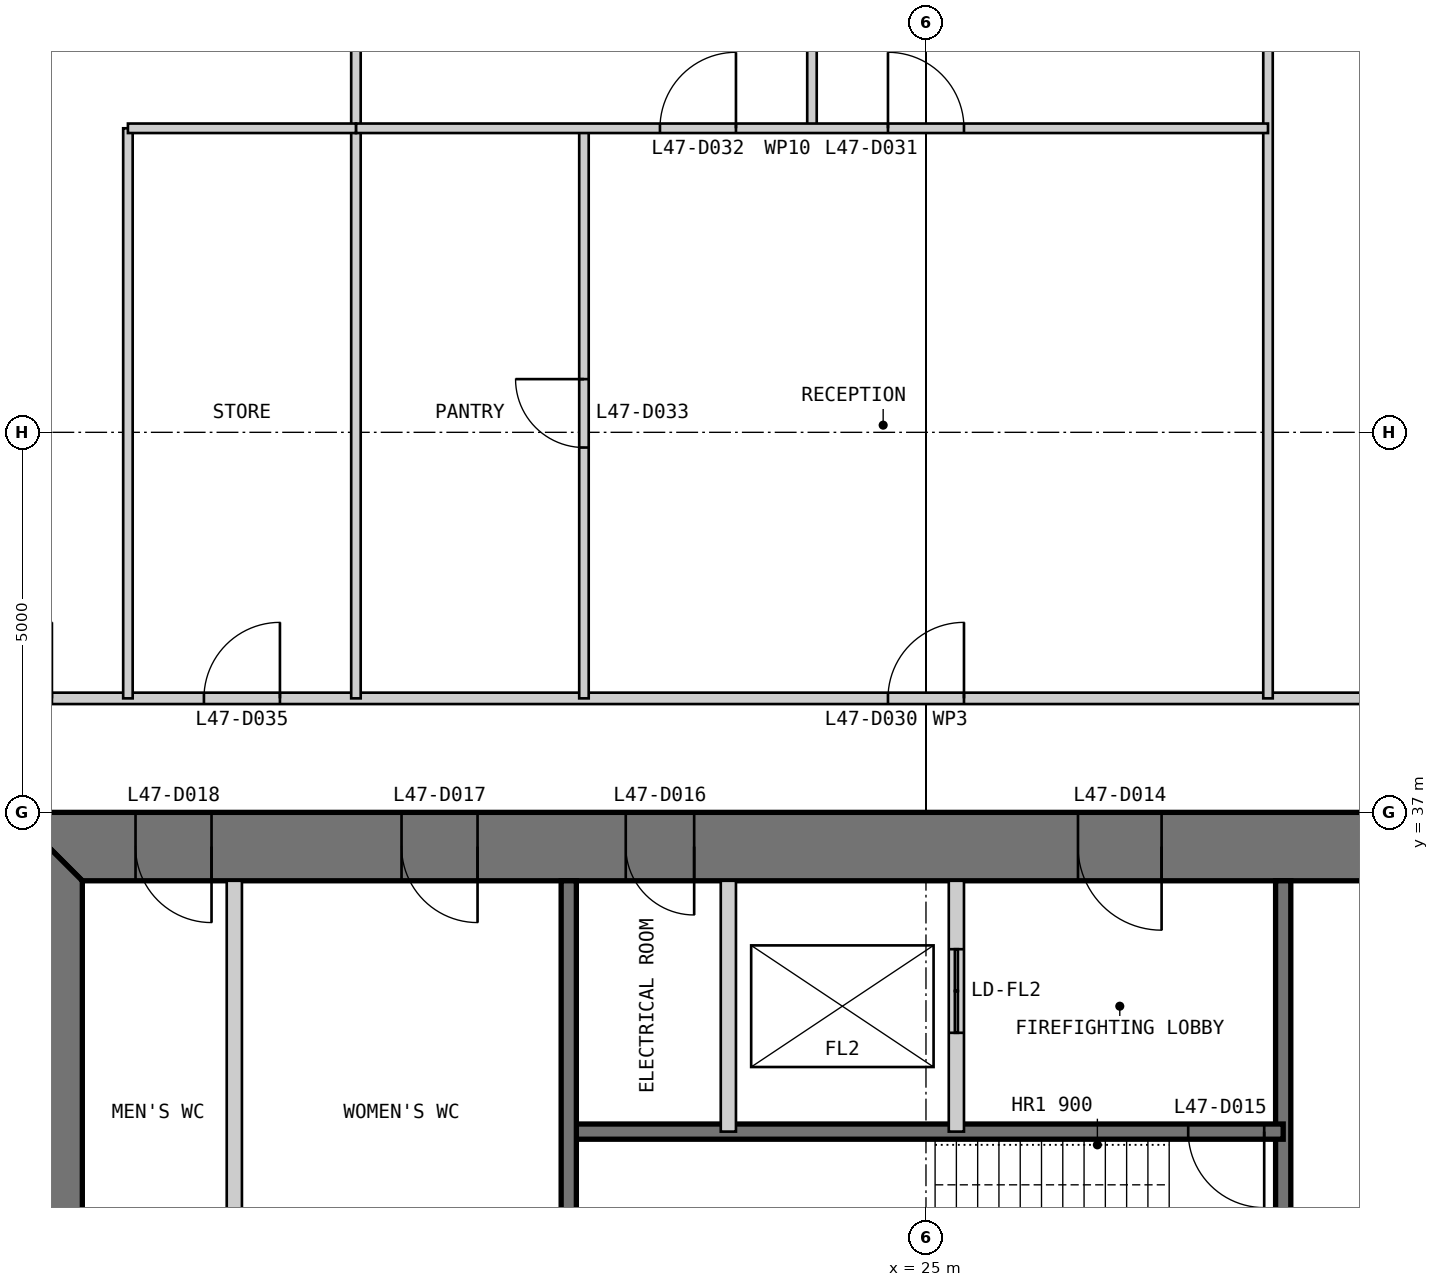
"""IFC4 building model, lengths in metres.
Left out: names, types, materials, properties, quantities, classifications, styles, units other than length and angle.
Written with IfcOpenShell. Run it as: python <this file> out.ifc"""

import sys

from ifc_helpers import new_model, si_unit, direction, frame, frame_2d, origin, place, context, subcontext, project, spatial, polyline, rectangle, outline, extrude, element, fill, save


model = new_model("IFC4")
c1 = context("Model", 3, precision=1e-05, world=origin(), true_north=direction((0.0, 1.0)))
c2 = subcontext(c1, "Body", "Model", "MODEL_VIEW")
j1 = project(units=[si_unit("LENGTHUNIT", "METRE"), si_unit("PLANEANGLEUNIT", "RADIAN")], contexts=[c1])
p1 = place(None, origin())
s1 = spatial("IfcSite", under=j1, at=p1, CompositionType="ELEMENT")
p2 = place(p1, origin())
s2 = spatial("IfcBuilding", under=s1, at=p2, CompositionType="ELEMENT")
p3 = place(p2, frame((0.0, 0.0, 201.8)))
s3 = spatial("IfcBuildingStorey", under=s2, at=p3, CompositionType="ELEMENT", Elevation=201.8)
p4 = place(p3, frame((37.0, 36.55, 0.0), z_axis=(0.0, 0.0, 1.0), x_axis=(-1.0, 0.0, 0.0)))
e1 = element("IfcWall", 1, at=p4, inside=s3, PredefinedType="SHEAR", context=c2, shape_type="SweptSolid", body=[
    extrude(outline(polyline([(0.0, -0.45), (24.0, -0.45), (23.1, 0.45), (0.9, 0.45), (0.0, -0.45)])), origin(), (0.0, 0.0, 1.0), 4.0),
])
p5 = place(p4, frame((4.9, 0.0, 0.0)))
e2 = element("IfcOpeningElement", 2, at=p5, cuts=e1, PredefinedType="OPENING", context=c2, shape_type="SweptSolid", body=[
    extrude(rectangle(XDim=1.0, YDim=2.2, at=frame_2d((0.5, 1.1))), frame((0.0, 0.46, 0.0), z_axis=(0.0, -1.0, 0.0), x_axis=(1.0, 0.0, 0.0)), (0.0, 0.0, 1.0), 0.92),
])
p6 = place(p4, frame((8.9, 0.0, 0.0)))
e3 = element("IfcOpeningElement", 3, at=p6, cuts=e1, PredefinedType="OPENING", context=c2, shape_type="SweptSolid", body=[
    extrude(rectangle(XDim=1.1, YDim=2.2, at=frame_2d((0.55, 1.1))), frame((0.0, 0.46, 0.0), z_axis=(0.0, -1.0, 0.0), x_axis=(1.0, 0.0, 0.0)), (0.0, 0.0, 1.0), 0.92),
])
p7 = place(p4, frame((15.05, 0.0, 0.0)))
e4 = element("IfcOpeningElement", 4, at=p7, cuts=e1, PredefinedType="OPENING", context=c2, shape_type="SweptSolid", body=[
    extrude(rectangle(XDim=0.9, YDim=2.2, at=frame_2d((0.45, 1.1))), frame((0.0, 0.46, 0.0), z_axis=(0.0, -1.0, 0.0), x_axis=(1.0, 0.0, 0.0)), (0.0, 0.0, 1.0), 0.92),
])
p8 = place(p4, frame((17.9, 0.0, 0.0)))
e5 = element("IfcOpeningElement", 5, at=p8, cuts=e1, PredefinedType="OPENING", context=c2, shape_type="SweptSolid", body=[
    extrude(rectangle(XDim=1.0, YDim=2.2, at=frame_2d((0.5, 1.1))), frame((0.0, 0.46, 0.0), z_axis=(0.0, -1.0, 0.0), x_axis=(1.0, 0.0, 0.0)), (0.0, 0.0, 1.0), 0.92),
])
p9 = place(p4, frame((21.4, 0.0, 0.0)))
e6 = element("IfcOpeningElement", 6, at=p9, cuts=e1, PredefinedType="OPENING", context=c2, shape_type="SweptSolid", body=[
    extrude(rectangle(XDim=1.0, YDim=2.2, at=frame_2d((0.5, 1.1))), frame((0.0, 0.46, 0.0), z_axis=(0.0, -1.0, 0.0), x_axis=(1.0, 0.0, 0.0)), (0.0, 0.0, 1.0), 0.92),
])
p10 = place(p3, frame((13.45, 36.1, 0.0), z_axis=(0.0, 0.0, 1.0), x_axis=(0.0, -1.0, 0.0)))
e7 = element("IfcWall", 7, at=p10, inside=s3, PredefinedType="SHEAR", context=c2, shape_type="SweptSolid", body=[
    extrude(outline(polyline([(-0.9, -0.45), (23.1, -0.45), (22.2, 0.45), (0.0, 0.45), (-0.9, -0.45)])), origin(), (0.0, 0.0, 1.0), 4.0),
])
p11 = place(p10, frame((20.2, 0.0, 0.0)))
e8 = element("IfcOpeningElement", 8, at=p11, cuts=e7, PredefinedType="OPENING", context=c2, shape_type="SweptSolid", body=[
    extrude(rectangle(XDim=1.0, YDim=2.2, at=frame_2d((0.5, 1.1))), frame((0.0, 0.46, 0.0), z_axis=(0.0, -1.0, 0.0), x_axis=(1.0, 0.0, 0.0)), (0.0, 0.0, 1.0), 0.92),
])
p12 = place(p10, frame((17.25, 0.0, 0.0)))
e9 = element("IfcOpeningElement", 9, at=p12, cuts=e7, PredefinedType="OPENING", context=c2, shape_type="SweptSolid", body=[
    extrude(rectangle(XDim=0.9, YDim=2.2, at=frame_2d((0.45, 1.1))), frame((0.0, 0.46, 0.0), z_axis=(0.0, -1.0, 0.0), x_axis=(1.0, 0.0, 0.0)), (0.0, 0.0, 1.0), 0.92),
])
p13 = place(p3, frame((29.7, 36.1, 0.0), z_axis=(0.0, 0.0, 1.0), x_axis=(0.0, -1.0, 0.0)))
e10 = element("IfcWall", 10, at=p13, inside=s3, PredefinedType="SOLIDWALL", context=c2, shape_type="SweptSolid", body=[
    extrude(rectangle(XDim=16.1, YDim=0.2, at=frame_2d((8.05, 0.0))), origin(), (0.0, 0.0, 1.0), 3.8),
])
p14 = place(p13, frame((7.217, 0.0, 0.0)))
e11 = element("IfcOpeningElement", 11, at=p14, cuts=e10, PredefinedType="OPENING", context=c2, shape_type="SweptSolid", body=[
    extrude(rectangle(XDim=1.1, YDim=2.2, at=frame_2d((0.55, 1.1))), frame((0.0, 0.11, 0.0), z_axis=(0.0, -1.0, 0.0), x_axis=(1.0, 0.0, 0.0)), (0.0, 0.0, 1.0), 0.22),
])
p15 = place(p13, frame((10.55, 0.0, 0.0)))
e12 = element("IfcOpeningElement", 12, at=p15, cuts=e10, PredefinedType="OPENING", context=c2, shape_type="SweptSolid", body=[
    extrude(rectangle(XDim=1.1, YDim=2.2, at=frame_2d((0.55, 1.1))), frame((0.0, 0.11, 0.0), z_axis=(0.0, -1.0, 0.0), x_axis=(1.0, 0.0, 0.0)), (0.0, 0.0, 1.0), 0.22),
])
p16 = place(p13, frame((13.883, 0.0, 0.0)))
e13 = element("IfcOpeningElement", 13, at=p16, cuts=e10, PredefinedType="OPENING", context=c2, shape_type="SweptSolid", body=[
    extrude(rectangle(XDim=1.1, YDim=2.2, at=frame_2d((0.55, 1.1))), frame((0.0, 0.11, 0.0), z_axis=(0.0, -1.0, 0.0), x_axis=(1.0, 0.0, 0.0)), (0.0, 0.0, 1.0), 0.22),
])
p17 = place(p3, frame((29.7, 32.8, 0.0), z_axis=(0.0, 0.0, 1.0), x_axis=(-1.0, 0.0, 0.0)))
e14 = element("IfcWall", 14, at=p17, inside=s3, PredefinedType="SOLIDWALL", context=c2, shape_type="SweptSolid", body=[
    extrude(rectangle(XDim=9.4, YDim=0.2, at=frame_2d((4.7, 0.0))), origin(), (0.0, 0.0, 1.0), 3.8),
])
p18 = place(p17, frame((0.25, 0.0, 0.0)))
e15 = element("IfcOpeningElement", 15, at=p18, cuts=e14, PredefinedType="OPENING", context=c2, shape_type="SweptSolid", body=[
    extrude(rectangle(XDim=1.0, YDim=2.2, at=frame_2d((0.5, 1.1))), frame((0.0, 0.11, 0.0), z_axis=(0.0, -1.0, 0.0), x_axis=(1.0, 0.0, 0.0)), (0.0, 0.0, 1.0), 0.22),
])
p19 = place(p3, frame((25.4, 36.1, 0.0), z_axis=(0.0, 0.0, 1.0), x_axis=(0.0, -1.0, 0.0)))
e16 = element("IfcWall", 16, at=p19, inside=s3, PredefinedType="PARTITIONING", context=c2, shape_type="SweptSolid", body=[
    extrude(rectangle(XDim=3.3, YDim=0.2, at=frame_2d((1.65, 0.0))), origin(), (0.0, 0.0, 1.0), 3.8),
])
p20 = place(p19, frame((0.9, 0.0, 0.0)))
e17 = element("IfcOpeningElement", 17, at=p20, cuts=e16, PredefinedType="OPENING", context=c2, shape_type="SweptSolid", body=[
    extrude(rectangle(XDim=1.1, YDim=2.2, at=frame_2d((0.55, 1.1))), frame((0.0, 0.11, 0.0), z_axis=(0.0, -1.0, 0.0), x_axis=(1.0, 0.0, 0.0)), (0.0, 0.0, 1.0), 0.22),
])
p21 = place(p3, frame((22.4, 36.1, 0.0), z_axis=(0.0, 0.0, 1.0), x_axis=(0.0, -1.0, 0.0)))
e18 = element("IfcWall", 18, at=p21, inside=s3, PredefinedType="PARTITIONING", context=c2, shape_type="SweptSolid", body=[
    extrude(rectangle(XDim=3.3, YDim=0.2, at=frame_2d((1.65, 0.0))), origin(), (0.0, 0.0, 1.0), 3.8),
])
p22 = place(p3, frame((20.3, 36.1, 0.0), z_axis=(0.0, 0.0, 1.0), x_axis=(0.0, -1.0, 0.0)))
e19 = element("IfcWall", 19, at=p22, inside=s3, PredefinedType="SOLIDWALL", context=c2, shape_type="SweptSolid", body=[
    extrude(rectangle(XDim=6.1, YDim=0.2, at=frame_2d((3.05, 0.0))), origin(), (0.0, 0.0, 1.0), 3.8),
])
p23 = place(p3, frame((15.9, 36.1, 0.0), z_axis=(0.0, 0.0, 1.0), x_axis=(0.0, -1.0, 0.0)))
e20 = element("IfcWall", 20, at=p23, inside=s3, PredefinedType="PARTITIONING", context=c2, shape_type="SweptSolid", body=[
    extrude(rectangle(XDim=6.1, YDim=0.2, at=frame_2d((3.05, 0.0))), origin(), (0.0, 0.0, 1.0), 3.8),
])
p24 = place(p3, frame((38.5, 38.5, 0.0), z_axis=(0.0, 0.0, 1.0), x_axis=(-1.0, 0.0, 0.0)))
e21 = element("IfcWall", 21, at=p24, inside=s3, PredefinedType="PARTITIONING", context=c2, shape_type="SweptSolid", body=[
    extrude(rectangle(XDim=27.0, YDim=0.15, at=frame_2d((13.5, 0.0))), origin(), (0.0, 0.0, 1.0), 3.85),
])
p25 = place(p24, frame((13.0, 0.0, 0.0)))
e22 = element("IfcOpeningElement", 22, at=p25, cuts=e21, PredefinedType="OPENING", context=c2, shape_type="SweptSolid", body=[
    extrude(rectangle(XDim=1.0, YDim=2.2, at=frame_2d((0.5, 1.1))), frame((0.0, 0.085, 0.0), z_axis=(0.0, -1.0, 0.0), x_axis=(1.0, 0.0, 0.0)), (0.0, 0.0, 1.0), 0.17),
])
p26 = place(p24, frame((4.0, 0.0, 0.0)))
e23 = element("IfcOpeningElement", 23, at=p26, cuts=e21, PredefinedType="OPENING", context=c2, shape_type="SweptSolid", body=[
    extrude(rectangle(XDim=1.0, YDim=2.2, at=frame_2d((0.5, 1.1))), frame((0.0, 0.085, 0.0), z_axis=(0.0, -1.0, 0.0), x_axis=(1.0, 0.0, 0.0)), (0.0, 0.0, 1.0), 0.17),
])
p27 = place(p24, frame((22.0, 0.0, 0.0)))
e24 = element("IfcOpeningElement", 24, at=p27, cuts=e21, PredefinedType="OPENING", context=c2, shape_type="SweptSolid", body=[
    extrude(rectangle(XDim=1.0, YDim=2.2, at=frame_2d((0.5, 1.1))), frame((0.0, 0.085, 0.0), z_axis=(0.0, -1.0, 0.0), x_axis=(1.0, 0.0, 0.0)), (0.0, 0.0, 1.0), 0.17),
])
p28 = place(p24, frame((25.0, 0.0, 0.0)))
e25 = element("IfcOpeningElement", 25, at=p28, cuts=e21, PredefinedType="OPENING", context=c2, shape_type="SweptSolid", body=[
    extrude(rectangle(XDim=1.0, YDim=2.2, at=frame_2d((0.5, 1.1))), frame((0.0, 0.085, 0.0), z_axis=(0.0, -1.0, 0.0), x_axis=(1.0, 0.0, 0.0)), (0.0, 0.0, 1.0), 0.17),
])
p29 = place(p3, frame((29.5, 49.85, 0.0), z_axis=(0.0, 0.0, 1.0), x_axis=(0.0, -1.0, 0.0)))
e26 = element("IfcWall", 26, at=p29, inside=s3, PredefinedType="PARTITIONING", context=c2, shape_type="SweptSolid", body=[
    extrude(rectangle(XDim=11.35, YDim=0.125, at=frame_2d((5.675, 0.0))), origin(), (0.0, 0.0, 1.0), 3.85),
])
p30 = place(p3, frame((23.5, 49.85, 0.0), z_axis=(0.0, 0.0, 1.0), x_axis=(0.0, -1.0, 0.0)))
e27 = element("IfcWall", 27, at=p30, inside=s3, PredefinedType="PARTITIONING", context=c2, shape_type="SweptSolid", body=[
    extrude(rectangle(XDim=3.85, YDim=0.125, at=frame_2d((1.925, 0.0))), origin(), (0.0, 0.0, 1.0), 3.85),
])
p31 = place(p3, frame((20.5, 46.0, 0.0), z_axis=(0.0, 0.0, 1.0), x_axis=(0.0, -1.0, 0.0)))
e28 = element("IfcWall", 28, at=p31, inside=s3, PredefinedType="PARTITIONING", context=c2, shape_type="SweptSolid", body=[
    extrude(rectangle(XDim=7.5, YDim=0.125, at=frame_2d((3.75, 0.0))), origin(), (0.0, 0.0, 1.0), 3.85),
])
p32 = place(p31, frame((3.3, 0.0, 0.0)))
e29 = element("IfcOpeningElement", 29, at=p32, cuts=e28, PredefinedType="OPENING", context=c2, shape_type="SweptSolid", body=[
    extrude(rectangle(XDim=0.9, YDim=2.2, at=frame_2d((0.45, 1.1))), frame((0.0, 0.073, 0.0), z_axis=(0.0, -1.0, 0.0), x_axis=(1.0, 0.0, 0.0)), (0.0, 0.0, 1.0), 0.145),
])
p33 = place(p3, frame((17.5, 49.85, 0.0), z_axis=(0.0, 0.0, 1.0), x_axis=(0.0, -1.0, 0.0)))
e30 = element("IfcWall", 30, at=p33, inside=s3, PredefinedType="PARTITIONING", context=c2, shape_type="SweptSolid", body=[
    extrude(rectangle(XDim=11.35, YDim=0.125, at=frame_2d((5.675, 0.0))), origin(), (0.0, 0.0, 1.0), 3.85),
])
p34 = place(p3, frame((14.5, 46.0, 0.0), z_axis=(0.0, 0.0, 1.0), x_axis=(0.0, -1.0, 0.0)))
e31 = element("IfcWall", 31, at=p34, inside=s3, PredefinedType="PARTITIONING", context=c2, shape_type="SweptSolid", body=[
    extrude(rectangle(XDim=7.5, YDim=0.125, at=frame_2d((3.75, 0.0))), origin(), (0.0, 0.0, 1.0), 3.85),
])
p35 = place(p3, frame((29.5, 46.0, 0.0), z_axis=(0.0, 0.0, 1.0), x_axis=(-1.0, 0.0, 0.0)))
e32 = element("IfcWall", 32, at=p35, inside=s3, PredefinedType="PARTITIONING", context=c2, shape_type="SweptSolid", body=[
    extrude(rectangle(XDim=12.0, YDim=0.125, at=frame_2d((6.0, 0.0))), origin(), (0.0, 0.0, 1.0), 3.85),
])
p36 = place(p35, frame((4.0, 0.0, 0.0)))
e33 = element("IfcOpeningElement", 33, at=p36, cuts=e32, PredefinedType="OPENING", context=c2, shape_type="SweptSolid", body=[
    extrude(rectangle(XDim=1.0, YDim=2.2, at=frame_2d((0.5, 1.1))), frame((0.0, 0.073, 0.0), z_axis=(0.0, -1.0, 0.0), x_axis=(1.0, 0.0, 0.0)), (0.0, 0.0, 1.0), 0.145),
])
p37 = place(p35, frame((7.0, 0.0, 0.0)))
e34 = element("IfcOpeningElement", 34, at=p37, cuts=e32, PredefinedType="OPENING", context=c2, shape_type="SweptSolid", body=[
    extrude(rectangle(XDim=1.0, YDim=2.2, at=frame_2d((0.5, 1.1))), frame((0.0, 0.073, 0.0), z_axis=(0.0, -1.0, 0.0), x_axis=(1.0, 0.0, 0.0)), (0.0, 0.0, 1.0), 0.145),
])
p38 = place(p3, frame((17.5, 46.0, 0.0), z_axis=(0.0, 0.0, 1.0), x_axis=(-1.0, 0.0, 0.0)))
e35 = element("IfcWall", 35, at=p38, inside=s3, PredefinedType="PARTITIONING", context=c2, shape_type="SweptSolid", body=[
    extrude(rectangle(XDim=3.0, YDim=0.125, at=frame_2d((1.5, 0.0))), origin(), (0.0, 0.0, 1.0), 3.85),
])
p39 = place(p6, origin())
e36 = element("IfcDoor", 36, at=p39, inside=s3, OperationType="SINGLE_SWING_LEFT", PredefinedType="DOOR", context=c2, shape_type="SweptSolid", body=[
    extrude(rectangle(XDim=1.1, YDim=2.2, at=frame_2d((0.55, 1.1))), frame((0.0, 0.025, 0.0), z_axis=(0.0, -1.0, 0.0), x_axis=(1.0, 0.0, 0.0)), (0.0, 0.0, 1.0), 0.05),
    extrude(outline(polyline([(0.0, 0.0), (0.04, 0.0), (0.04, 2.16), (1.06, 2.16), (1.06, 0.0), (1.1, 0.0), (1.1, 2.2), (0.0, 2.2), (0.0, 0.0)])), frame((0.0, 0.3, 0.0), z_axis=(0.0, -1.0, 0.0), x_axis=(1.0, 0.0, 0.0)), (0.0, 0.0, 1.0), 0.6),
])
fill(e3, e36)
p40 = place(p18, origin())
e37 = element("IfcDoor", 37, at=p40, inside=s3, OperationType="SINGLE_SWING_LEFT", PredefinedType="DOOR", context=c2, shape_type="SweptSolid", body=[
    extrude(rectangle(XDim=1.0, YDim=2.2, at=frame_2d((0.5, 1.1))), frame((0.0, 0.025, 0.0), z_axis=(0.0, -1.0, 0.0), x_axis=(1.0, 0.0, 0.0)), (0.0, 0.0, 1.0), 0.05),
])
fill(e15, e37)
p41 = place(p7, origin())
e38 = element("IfcDoor", 38, at=p41, inside=s3, OperationType="SINGLE_SWING_LEFT", PredefinedType="DOOR", context=c2, shape_type="SweptSolid", body=[
    extrude(rectangle(XDim=0.9, YDim=2.2, at=frame_2d((0.45, 1.1))), frame((0.0, 0.025, 0.0), z_axis=(0.0, -1.0, 0.0), x_axis=(1.0, 0.0, 0.0)), (0.0, 0.0, 1.0), 0.05),
    extrude(outline(polyline([(0.0, 0.0), (0.04, 0.0), (0.04, 2.16), (0.86, 2.16), (0.86, 0.0), (0.9, 0.0), (0.9, 2.2), (0.0, 2.2), (0.0, 0.0)])), frame((0.0, 0.3, 0.0), z_axis=(0.0, -1.0, 0.0), x_axis=(1.0, 0.0, 0.0)), (0.0, 0.0, 1.0), 0.6),
])
fill(e4, e38)
p42 = place(p8, origin())
e39 = element("IfcDoor", 39, at=p42, inside=s3, OperationType="SINGLE_SWING_LEFT", PredefinedType="DOOR", context=c2, shape_type="SweptSolid", body=[
    extrude(rectangle(XDim=1.0, YDim=2.2, at=frame_2d((0.5, 1.1))), frame((0.0, 0.025, 0.0), z_axis=(0.0, -1.0, 0.0), x_axis=(1.0, 0.0, 0.0)), (0.0, 0.0, 1.0), 0.05),
    extrude(outline(polyline([(0.0, 0.0), (0.04, 0.0), (0.04, 2.16), (0.96, 2.16), (0.96, 0.0), (1.0, 0.0), (1.0, 2.2), (0.0, 2.2), (0.0, 0.0)])), frame((0.0, 0.3, 0.0), z_axis=(0.0, -1.0, 0.0), x_axis=(1.0, 0.0, 0.0)), (0.0, 0.0, 1.0), 0.6),
])
fill(e5, e39)
p43 = place(p9, origin())
e40 = element("IfcDoor", 40, at=p43, inside=s3, OperationType="SINGLE_SWING_LEFT", PredefinedType="DOOR", context=c2, shape_type="SweptSolid", body=[
    extrude(rectangle(XDim=1.0, YDim=2.2, at=frame_2d((0.5, 1.1))), frame((0.0, 0.025, 0.0), z_axis=(0.0, -1.0, 0.0), x_axis=(1.0, 0.0, 0.0)), (0.0, 0.0, 1.0), 0.05),
    extrude(outline(polyline([(0.0, 0.0), (0.04, 0.0), (0.04, 2.16), (0.96, 2.16), (0.96, 0.0), (1.0, 0.0), (1.0, 2.2), (0.0, 2.2), (0.0, 0.0)])), frame((0.0, 0.3, 0.0), z_axis=(0.0, -1.0, 0.0), x_axis=(1.0, 0.0, 0.0)), (0.0, 0.0, 1.0), 0.6),
])
fill(e6, e40)
p44 = place(p25, frame((1.0, 0.0, 0.0), z_axis=(0.0, 0.0, 1.0), x_axis=(-1.0, 0.0, 0.0)))
e41 = element("IfcDoor", 41, at=p44, inside=s3, OperationType="SINGLE_SWING_RIGHT", PredefinedType="DOOR", context=c2, shape_type="SweptSolid", body=[
    extrude(rectangle(XDim=1.0, YDim=2.2, at=frame_2d((0.5, 1.1))), frame((0.0, 0.025, 0.0), z_axis=(0.0, -1.0, 0.0), x_axis=(1.0, 0.0, 0.0)), (0.0, 0.0, 1.0), 0.05),
])
fill(e22, e41)
p45 = place(p36, frame((1.0, 0.0, 0.0), z_axis=(0.0, 0.0, 1.0), x_axis=(-1.0, 0.0, 0.0)))
e42 = element("IfcDoor", 42, at=p45, inside=s3, OperationType="SINGLE_SWING_LEFT", PredefinedType="DOOR", context=c2, shape_type="SweptSolid", body=[
    extrude(rectangle(XDim=1.0, YDim=2.2, at=frame_2d((0.5, 1.1))), frame((0.0, 0.025, 0.0), z_axis=(0.0, -1.0, 0.0), x_axis=(1.0, 0.0, 0.0)), (0.0, 0.0, 1.0), 0.05),
])
fill(e33, e42)
p46 = place(p37, frame((1.0, 0.0, 0.0), z_axis=(0.0, 0.0, 1.0), x_axis=(-1.0, 0.0, 0.0)))
e43 = element("IfcDoor", 43, at=p46, inside=s3, OperationType="SINGLE_SWING_RIGHT", PredefinedType="DOOR", context=c2, shape_type="SweptSolid", body=[
    extrude(rectangle(XDim=1.0, YDim=2.2, at=frame_2d((0.5, 1.1))), frame((0.0, 0.025, 0.0), z_axis=(0.0, -1.0, 0.0), x_axis=(1.0, 0.0, 0.0)), (0.0, 0.0, 1.0), 0.05),
])
fill(e34, e43)
p47 = place(p32, frame((0.9, 0.0, 0.0), z_axis=(0.0, 0.0, 1.0), x_axis=(-1.0, 0.0, 0.0)))
e44 = element("IfcDoor", 44, at=p47, inside=s3, OperationType="SINGLE_SWING_RIGHT", PredefinedType="DOOR", context=c2, shape_type="SweptSolid", body=[
    extrude(rectangle(XDim=0.9, YDim=2.2, at=frame_2d((0.45, 1.1))), frame((0.0, 0.025, 0.0), z_axis=(0.0, -1.0, 0.0), x_axis=(1.0, 0.0, 0.0)), (0.0, 0.0, 1.0), 0.05),
])
fill(e29, e44)
p48 = place(p27, frame((1.0, 0.0, 0.0), z_axis=(0.0, 0.0, 1.0), x_axis=(-1.0, 0.0, 0.0)))
e45 = element("IfcDoor", 45, at=p48, inside=s3, OperationType="SINGLE_SWING_RIGHT", PredefinedType="DOOR", context=c2, shape_type="SweptSolid", body=[
    extrude(rectangle(XDim=1.0, YDim=2.2, at=frame_2d((0.5, 1.1))), frame((0.0, 0.025, 0.0), z_axis=(0.0, -1.0, 0.0), x_axis=(1.0, 0.0, 0.0)), (0.0, 0.0, 1.0), 0.05),
])
fill(e24, e45)
p49 = place(p20, origin())
e46 = element("IfcDoor", 46, at=p49, inside=s3, OperationType="DOUBLE_DOOR_SLIDING", PredefinedType="DOOR", context=c2, shape_type="SweptSolid", body=[
    extrude(rectangle(XDim=1.1, YDim=2.2, at=frame_2d((0.55, 1.1))), frame((0.0, 0.025, 0.0), z_axis=(0.0, -1.0, 0.0), x_axis=(1.0, 0.0, 0.0)), (0.0, 0.0, 1.0), 0.05),
])
fill(e17, e46)
save(model, sys.argv[1])
